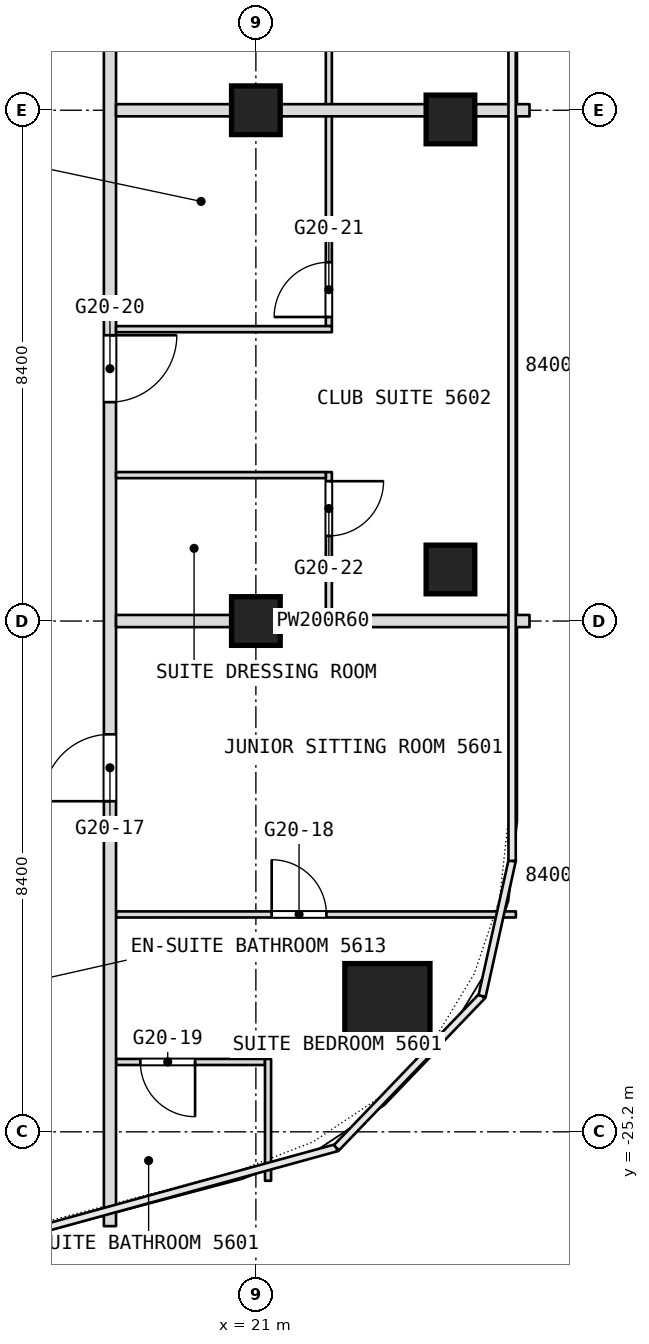
"""IFC4 building model, lengths in metres.
Left out: names, types, materials, properties, quantities, classifications, styles, units other than length and angle.
Written with IfcOpenShell. Run it as: python <this file> out.ifc"""

import sys

from ifc_helpers import new_model, si_unit, direction, frame, frame_2d, origin, origin_2d, place, context, subcontext, project, spatial, rectangle, extrude, element, fill, save


model = new_model("IFC4")
c1 = context("Model", 3, precision=1e-05, world=origin(), true_north=direction((0.0, 1.0)))
c2 = subcontext(c1, "Body", "Model", "MODEL_VIEW")
j1 = project(units=[si_unit("LENGTHUNIT", "METRE"), si_unit("PLANEANGLEUNIT", "RADIAN")], contexts=[c1])
p1 = place(None, origin())
s1 = spatial("IfcSite", under=j1, at=p1, CompositionType="ELEMENT")
p2 = place(p1, origin())
s2 = spatial("IfcBuilding", under=s1, at=p2, CompositionType="ELEMENT")
p3 = place(p2, frame((0.0, 0.0, 238.1)))
s3 = spatial("IfcBuildingStorey", under=s2, at=p3, CompositionType="ELEMENT", Elevation=238.1)
p4 = place(p3, frame((23.163, -23.133, 0.0), z_axis=(0.0, 0.0, 1.0), x_axis=(1.0, 0.0, 0.0)))
e1 = element("IfcColumn", 1, at=p4, inside=s3, PredefinedType="COLUMN", context=c2, shape_type="SweptSolid", body=[
    extrude(rectangle(XDim=1.4, YDim=1.4, at=origin_2d()), origin(), (0.0, 0.0, 1.0), 3.6),
])
for number, where, z_axis, x_axis in (
    (2, (21.0, -16.8, 0.0), (0.0, 0.0, 1.0), (1.0, 0.0, 0.0)),
    (3, (21.0, -8.4, 0.0), (0.0, 0.0, 1.0), (1.0, 0.0, 0.0)),
    (4, (24.2, -8.551, 0.0), (0.0, 0.0, 1.0), (1.0, 0.0, 0.0)),
    (5, (24.2, -15.952, 0.0), (0.0, 0.0, 1.0), (1.0, 0.0, 0.0)),
):
    element("IfcColumn", number, at=place(p3, frame(where, z_axis=z_axis, x_axis=x_axis)), inside=s3, PredefinedType="COLUMN", context=c2, shape_type="SweptSolid", body=[
        extrude(rectangle(XDim=0.8, YDim=0.8, at=origin_2d()), origin(), (0.0, 0.0, 1.0), 3.6),
    ])
p5 = place(p3, frame((18.7, -24.051, 0.0), z_axis=(0.0, 0.0, 1.0), x_axis=(1.0, 0.0, 0.0)))
e6 = element("IfcWall", 6, at=p5, inside=s3, PredefinedType="PARTITIONING", context=c2, shape_type="SweptSolid", body=[
    extrude(rectangle(XDim=2.45, YDim=0.1, at=frame_2d((1.225, 0.0))), origin(), (0.0, 0.0, 1.0), 3.34),
])
p6 = place(p5, frame((0.4, 0.0, 0.0)))
e7 = element("IfcOpeningElement", 7, at=p6, cuts=e6, PredefinedType="OPENING", context=c2, shape_type="SweptSolid", body=[
    extrude(rectangle(XDim=0.9, YDim=2.1, at=frame_2d((0.45, 1.05))), frame((0.0, 0.05, 0.0), z_axis=(0.0, -1.0, 0.0), x_axis=(1.0, 0.0, 0.0)), (0.0, 0.0, 1.0), 0.1),
])
p7 = place(p3, frame((22.2, -16.7, 0.0), z_axis=(0.0, 0.0, 1.0), x_axis=(0.0, 1.0, 0.0)))
e8 = element("IfcWall", 8, at=p7, inside=s3, PredefinedType="PARTITIONING", context=c2, shape_type="SweptSolid", body=[
    extrude(rectangle(XDim=2.35, YDim=0.1, at=frame_2d((1.175, 0.0))), origin(), (0.0, 0.0, 1.0), 3.34),
])
p8 = place(p7, frame((1.3, 0.0, 0.0)))
e9 = element("IfcOpeningElement", 9, at=p8, cuts=e8, PredefinedType="OPENING", context=c2, shape_type="SweptSolid", body=[
    extrude(rectangle(XDim=0.9, YDim=2.1, at=frame_2d((0.45, 1.05))), frame((0.0, 0.05, 0.0), z_axis=(0.0, -1.0, 0.0), x_axis=(1.0, 0.0, 0.0)), (0.0, 0.0, 1.0), 0.1),
])
p9 = place(p3, frame((22.2, -11.95, 0.0), z_axis=(0.0, 0.0, 1.0), x_axis=(0.0, 1.0, 0.0)))
e10 = element("IfcWall", 10, at=p9, inside=s3, PredefinedType="PARTITIONING", context=c2, shape_type="SweptSolid", body=[
    extrude(rectangle(XDim=7.2, YDim=0.1, at=frame_2d((3.6, 0.0))), origin(), (0.0, 0.0, 1.0), 3.34),
])
p10 = place(p9, frame((0.15, 0.0, 0.0)))
e11 = element("IfcOpeningElement", 11, at=p10, cuts=e10, PredefinedType="OPENING", context=c2, shape_type="SweptSolid", body=[
    extrude(rectangle(XDim=0.9, YDim=2.1, at=frame_2d((0.45, 1.05))), frame((0.0, 0.05, 0.0), z_axis=(0.0, -1.0, 0.0), x_axis=(1.0, 0.0, 0.0)), (0.0, 0.0, 1.0), 0.1),
])
p11 = place(p9, frame((6.15, 0.0, 0.0)))
e12 = element("IfcOpeningElement", 12, at=p11, cuts=e10, PredefinedType="OPENING", context=c2, shape_type="SweptSolid", body=[
    extrude(rectangle(XDim=0.9, YDim=2.1, at=frame_2d((0.45, 1.05))), frame((0.0, 0.05, 0.0), z_axis=(0.0, -1.0, 0.0), x_axis=(1.0, 0.0, 0.0)), (0.0, 0.0, 1.0), 0.1),
])
p12 = place(p3, frame((18.7, -21.625, 0.0), z_axis=(0.0, 0.0, 1.0), x_axis=(1.0, 0.0, 0.0)))
e13 = element("IfcWall", 13, at=p12, inside=s3, PredefinedType="PARTITIONING", context=c2, shape_type="SweptSolid", body=[
    extrude(rectangle(XDim=6.576, YDim=0.1, at=frame_2d((3.288, 0.0))), origin(), (0.0, 0.0, 1.0), 3.34),
])
p13 = place(p12, frame((2.56, 0.0, 0.0)))
e14 = element("IfcOpeningElement", 14, at=p13, cuts=e13, PredefinedType="OPENING", context=c2, shape_type="SweptSolid", body=[
    extrude(rectangle(XDim=0.9, YDim=2.1, at=frame_2d((0.45, 1.05))), frame((0.0, 0.05, 0.0), z_axis=(0.0, -1.0, 0.0), x_axis=(1.0, 0.0, 0.0)), (0.0, 0.0, 1.0), 0.1),
])
p14 = place(p3, frame((21.2, -26.005, 0.0), z_axis=(0.0, 0.0, 1.0), x_axis=(0.0, 1.0, 0.0)))
e15 = element("IfcWall", 15, at=p14, inside=s3, PredefinedType="PARTITIONING", context=c2, shape_type="SweptSolid", body=[
    extrude(rectangle(XDim=2.004, YDim=0.1, at=frame_2d((1.002, 0.0))), origin(), (0.0, 0.0, 1.0), 3.34),
])
p15 = place(p3, frame((18.6, -26.751, 0.0), z_axis=(0.0, 0.0, 1.0), x_axis=(0.0, 1.0, 0.0)))
e16 = element("IfcWall", 16, at=p15, inside=s3, PredefinedType="PARTITIONING", context=c2, shape_type="SweptSolid", body=[
    extrude(rectangle(XDim=49.091, YDim=0.2, at=frame_2d((24.545, 0.0))), origin(), (0.0, 0.0, 1.0), 3.34),
])
p16 = place(p15, frame((6.988, 0.0, 0.0)))
e17 = element("IfcOpeningElement", 17, at=p16, cuts=e16, PredefinedType="OPENING", context=c2, shape_type="SweptSolid", body=[
    extrude(rectangle(XDim=1.1, YDim=2.1, at=frame_2d((0.55, 1.05))), frame((0.0, 0.1, 0.0), z_axis=(0.0, -1.0, 0.0), x_axis=(1.0, 0.0, 0.0)), (0.0, 0.0, 1.0), 0.2),
])
p17 = place(p15, frame((13.551, 0.0, 0.0)))
e18 = element("IfcOpeningElement", 18, at=p17, cuts=e16, PredefinedType="OPENING", context=c2, shape_type="SweptSolid", body=[
    extrude(rectangle(XDim=1.1, YDim=2.1, at=frame_2d((0.55, 1.05))), frame((0.0, 0.1, 0.0), z_axis=(0.0, -1.0, 0.0), x_axis=(1.0, 0.0, 0.0)), (0.0, 0.0, 1.0), 0.2),
])
p18 = place(p15, frame((22.051, 0.0, 0.0)))
e19 = element("IfcOpeningElement", 19, at=p18, cuts=e16, PredefinedType="OPENING", context=c2, shape_type="SweptSolid", body=[
    extrude(rectangle(XDim=1.1, YDim=2.1, at=frame_2d((0.55, 1.05))), frame((0.0, 0.1, 0.0), z_axis=(0.0, -1.0, 0.0), x_axis=(1.0, 0.0, 0.0)), (0.0, 0.0, 1.0), 0.2),
])
p19 = place(p15, frame((28.301, 0.0, 0.0)))
e20 = element("IfcOpeningElement", 20, at=p19, cuts=e16, PredefinedType="OPENING", context=c2, shape_type="SweptSolid", body=[
    extrude(rectangle(XDim=1.1, YDim=2.1, at=frame_2d((0.55, 1.05))), frame((0.0, 0.1, 0.0), z_axis=(0.0, -1.0, 0.0), x_axis=(1.0, 0.0, 0.0)), (0.0, 0.0, 1.0), 0.2),
])
p20 = place(p15, frame((37.951, 0.0, 0.0)))
e21 = element("IfcOpeningElement", 21, at=p20, cuts=e16, PredefinedType="OPENING", context=c2, shape_type="SweptSolid", body=[
    extrude(rectangle(XDim=1.0, YDim=2.1, at=frame_2d((0.5, 1.05))), frame((0.0, 0.1, 0.0), z_axis=(0.0, -1.0, 0.0), x_axis=(1.0, 0.0, 0.0)), (0.0, 0.0, 1.0), 0.2),
])
p21 = place(p15, frame((39.751, 0.0, 0.0)))
e22 = element("IfcOpeningElement", 22, at=p21, cuts=e16, PredefinedType="OPENING", context=c2, shape_type="SweptSolid", body=[
    extrude(rectangle(XDim=1.0, YDim=2.1, at=frame_2d((0.5, 1.05))), frame((0.0, 0.1, 0.0), z_axis=(0.0, -1.0, 0.0), x_axis=(1.0, 0.0, 0.0)), (0.0, 0.0, 1.0), 0.2),
])
p22 = place(p15, frame((44.051, 0.0, 0.0)))
e23 = element("IfcOpeningElement", 23, at=p22, cuts=e16, PredefinedType="OPENING", context=c2, shape_type="SweptSolid", body=[
    extrude(rectangle(XDim=1.0, YDim=2.1, at=frame_2d((0.5, 1.05))), frame((0.0, 0.1, 0.0), z_axis=(0.0, -1.0, 0.0), x_axis=(1.0, 0.0, 0.0)), (0.0, 0.0, 1.0), 0.2),
])
p23 = place(p3, frame((18.7, -16.8, 0.0), z_axis=(0.0, 0.0, 1.0), x_axis=(1.0, 0.0, 0.0)))
e24 = element("IfcWall", 24, at=p23, inside=s3, PredefinedType="PARTITIONING", context=c2, shape_type="SweptSolid", body=[
    extrude(rectangle(XDim=6.8, YDim=0.2, at=frame_2d((3.4, 0.0))), origin(), (0.0, 0.0, 1.0), 2.94),
])
p24 = place(p3, frame((18.7, -14.4, 0.0), z_axis=(0.0, 0.0, 1.0), x_axis=(1.0, 0.0, 0.0)))
e25 = element("IfcWall", 25, at=p24, inside=s3, PredefinedType="PARTITIONING", context=c2, shape_type="SweptSolid", body=[
    extrude(rectangle(XDim=3.45, YDim=0.1, at=frame_2d((1.725, 0.0))), origin(), (0.0, 0.0, 1.0), 3.34),
])
p25 = place(p3, frame((18.7, -12.0, 0.0), z_axis=(0.0, 0.0, 1.0), x_axis=(1.0, 0.0, 0.0)))
e26 = element("IfcWall", 26, at=p25, inside=s3, PredefinedType="PARTITIONING", context=c2, shape_type="SweptSolid", body=[
    extrude(rectangle(XDim=3.55, YDim=0.1, at=frame_2d((1.775, 0.0))), origin(), (0.0, 0.0, 1.0), 3.34),
])
p26 = place(p3, frame((18.7, -8.4, 0.0), z_axis=(0.0, 0.0, 1.0), x_axis=(1.0, 0.0, 0.0)))
e27 = element("IfcWall", 27, at=p26, inside=s3, PredefinedType="PARTITIONING", context=c2, shape_type="SweptSolid", body=[
    extrude(rectangle(XDim=6.8, YDim=0.2, at=frame_2d((3.4, 0.0))), origin(), (0.0, 0.0, 1.0), 2.94),
])
p27 = place(p6, origin())
e28 = element("IfcDoor", 28, at=p27, inside=s3, OperationType="SINGLE_SWING_RIGHT", PredefinedType="DOOR", context=c2, shape_type="SweptSolid", body=[
    extrude(rectangle(XDim=0.9, YDim=2.1, at=frame_2d((0.45, 1.05))), frame((0.0, 0.025, 0.0), z_axis=(0.0, -1.0, 0.0), x_axis=(1.0, 0.0, 0.0)), (0.0, 0.0, 1.0), 0.05),
])
fill(e7, e28)
p28 = place(p8, origin())
e29 = element("IfcDoor", 29, at=p28, inside=s3, OperationType="SINGLE_SWING_RIGHT", PredefinedType="DOOR", context=c2, shape_type="SweptSolid", body=[
    extrude(rectangle(XDim=0.9, YDim=2.1, at=frame_2d((0.45, 1.05))), frame((0.0, 0.025, 0.0), z_axis=(0.0, -1.0, 0.0), x_axis=(1.0, 0.0, 0.0)), (0.0, 0.0, 1.0), 0.05),
])
fill(e9, e29)
p29 = place(p10, origin())
e30 = element("IfcDoor", 30, at=p29, inside=s3, OperationType="SINGLE_SWING_LEFT", PredefinedType="DOOR", context=c2, shape_type="SweptSolid", body=[
    extrude(rectangle(XDim=0.9, YDim=2.1, at=frame_2d((0.45, 1.05))), frame((0.0, 0.025, 0.0), z_axis=(0.0, -1.0, 0.0), x_axis=(1.0, 0.0, 0.0)), (0.0, 0.0, 1.0), 0.05),
])
fill(e11, e30)
p30 = place(p13, origin())
e31 = element("IfcDoor", 31, at=p30, inside=s3, OperationType="SINGLE_SWING_LEFT", PredefinedType="DOOR", context=c2, shape_type="SweptSolid", body=[
    extrude(rectangle(XDim=0.9, YDim=2.1, at=frame_2d((0.45, 1.05))), frame((0.0, 0.025, 0.0), z_axis=(0.0, -1.0, 0.0), x_axis=(1.0, 0.0, 0.0)), (0.0, 0.0, 1.0), 0.05),
])
fill(e14, e31)
p31 = place(p16, origin())
e32 = element("IfcDoor", 32, at=p31, inside=s3, OperationType="SINGLE_SWING_LEFT", PredefinedType="DOOR", context=c2, shape_type="SweptSolid", body=[
    extrude(rectangle(XDim=1.1, YDim=2.1, at=frame_2d((0.55, 1.05))), frame((0.0, 0.025, 0.0), z_axis=(0.0, -1.0, 0.0), x_axis=(1.0, 0.0, 0.0)), (0.0, 0.0, 1.0), 0.05),
])
fill(e17, e32)
p32 = place(p17, origin())
e33 = element("IfcDoor", 33, at=p32, inside=s3, OperationType="SINGLE_SWING_LEFT", PredefinedType="DOOR", context=c2, shape_type="SweptSolid", body=[
    extrude(rectangle(XDim=1.1, YDim=2.1, at=frame_2d((0.55, 1.05))), frame((0.0, 0.025, 0.0), z_axis=(0.0, -1.0, 0.0), x_axis=(1.0, 0.0, 0.0)), (0.0, 0.0, 1.0), 0.05),
])
fill(e18, e33)
save(model, sys.argv[1])
